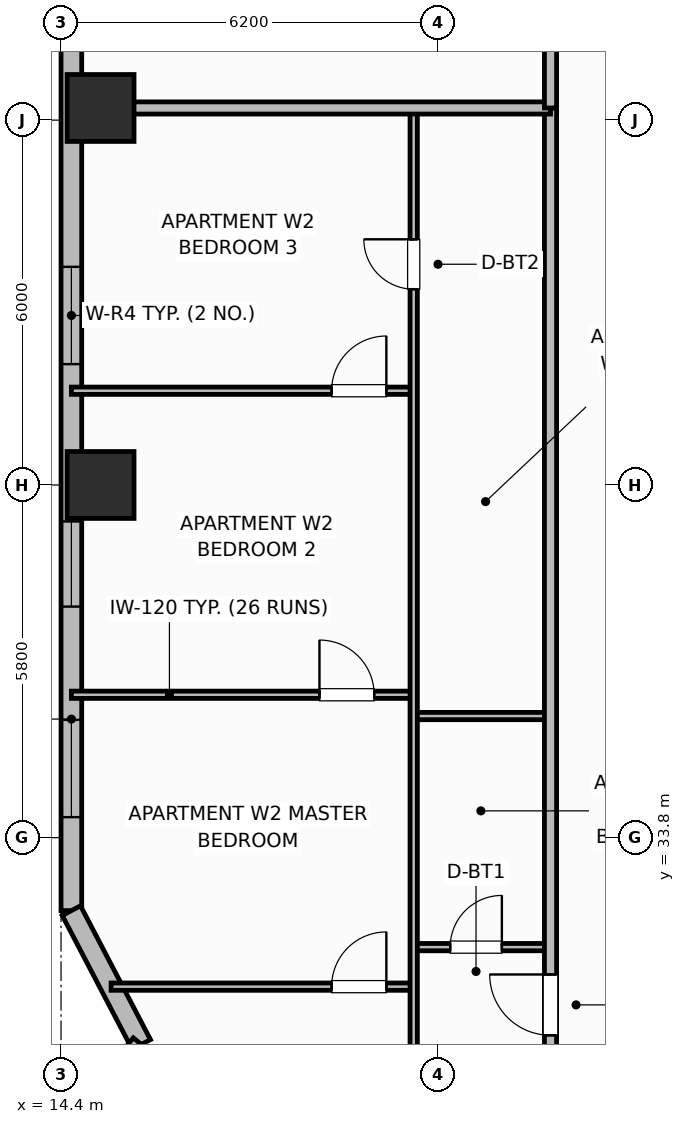
"""IFC4 building model, lengths in metres.
Left out: names, types, materials, properties, quantities, classifications, styles, units other than length and angle.
Written with IfcOpenShell. Run it as: python <this file> out.ifc"""

import sys

from ifc_helpers import new_model, si_unit, direction, frame, frame_2d, origin, origin_2d, place, context, subcontext, project, spatial, rectangle, extrude, element, fill, save


model = new_model("IFC4")
c1 = context("Model", 3, precision=1e-05, world=origin(), true_north=direction((0.0, 1.0)))
c2 = subcontext(c1, "Body", "Model", "MODEL_VIEW")
j1 = project(units=[si_unit("LENGTHUNIT", "METRE"), si_unit("PLANEANGLEUNIT", "RADIAN")], contexts=[c1])
p1 = place(None, origin())
s1 = spatial("IfcSite", under=j1, at=p1, CompositionType="ELEMENT")
p2 = place(p1, origin())
s2 = spatial("IfcBuilding", under=s1, at=p2, CompositionType="ELEMENT")
p3 = place(p2, frame((0.0, 0.0, 129.0)))
s3 = spatial("IfcBuildingStorey", under=s2, at=p3, CompositionType="ELEMENT", Elevation=129.0)
for number, where, z_axis, x_axis in (
    (1, (15.05, 39.6, 0.0), (0.0, 0.0, 1.0), (1.0, 0.0, 0.0)),
    (2, (15.05, 45.8, 0.0), (0.0, 0.0, 1.0), (1.0, 0.0, 0.0)),
):
    element("IfcColumn", number, at=place(p3, frame(where, z_axis=z_axis, x_axis=x_axis)), inside=s3, PredefinedType="COLUMN", context=c2, shape_type="SweptSolid", body=[
        extrude(rectangle(XDim=1.1, YDim=1.1, at=origin_2d()), origin(), (0.0, 0.0, 1.0), 3.7),
    ])
p4 = place(p3, frame((14.57, 47.4, 0.0), z_axis=(0.0, 0.0, 1.0), x_axis=(0.0, -1.0, 0.0)))
e3 = element("IfcWall", 3, at=p4, inside=s3, PredefinedType="SOLIDWALL", context=c2, shape_type="SweptSolid", body=[
    extrude(rectangle(XDim=14.8, YDim=0.34, at=frame_2d((7.4, 0.0))), origin(), (0.0, 0.0, 1.0), 2.7),
])
p5 = place(p4, frame((4.212, 0.0, 0.68)))
e4 = element("IfcOpeningElement", 4, at=p5, cuts=e3, PredefinedType="OPENING", context=c2, shape_type="SweptSolid", body=[
    extrude(rectangle(XDim=1.6, YDim=1.9, at=frame_2d((0.8, 0.95))), frame((0.0, 0.18, 0.0), z_axis=(0.0, -1.0, 0.0), x_axis=(1.0, 0.0, 0.0)), (0.0, 0.0, 1.0), 0.36),
])
p6 = place(p4, frame((8.4, 0.0, 0.69)))
e5 = element("IfcOpeningElement", 5, at=p6, cuts=e3, PredefinedType="OPENING", context=c2, shape_type="SweptSolid", body=[
    extrude(rectangle(XDim=1.4, YDim=1.85, at=frame_2d((0.7, 0.925))), frame((0.0, 0.18, 0.0), z_axis=(0.0, -1.0, 0.0), x_axis=(1.0, 0.0, 0.0)), (0.0, 0.0, 1.0), 0.36),
])
p7 = place(p4, frame((11.663, 0.0, 0.68)))
e6 = element("IfcOpeningElement", 6, at=p7, cuts=e3, PredefinedType="OPENING", context=c2, shape_type="SweptSolid", body=[
    extrude(rectangle(XDim=1.6, YDim=1.9, at=frame_2d((0.8, 0.95))), frame((0.0, 0.18, 0.0), z_axis=(0.0, -1.0, 0.0), x_axis=(1.0, 0.0, 0.0)), (0.0, 0.0, 1.0), 0.36),
])
p8 = place(p3, frame((14.57, 32.6, 0.0), z_axis=(0.0, 0.0, 1.0), x_axis=(0.463191013929, -0.88625847506, 0.0)))
e7 = element("IfcWall", 7, at=p8, inside=s3, PredefinedType="SOLIDWALL", context=c2, shape_type="SweptSolid", body=[
    extrude(rectangle(XDim=2.483, YDim=0.34, at=frame_2d((1.241, 0.0))), origin(), (0.0, 0.0, 1.0), 2.7),
])
p9 = place(p3, frame((15.72, 30.4, 0.0), z_axis=(0.0, 0.0, 1.0), x_axis=(-0.634733675645, -0.772730975827, 0.0)))
e8 = element("IfcWall", 8, at=p9, inside=s3, PredefinedType="SOLIDWALL", context=c2, shape_type="SweptSolid", body=[
    extrude(rectangle(XDim=1.812, YDim=0.34, at=frame_2d((0.906, 0.0))), origin(), (0.0, 0.0, 1.0), 2.7),
])
p10 = place(p3, frame((20.2, 32.0, 0.0), z_axis=(0.0, 0.0, 1.0), x_axis=(1.0, 0.0, 0.0)))
e9 = element("IfcWall", 9, at=p10, inside=s3, PredefinedType="PARTITIONING", context=c2, shape_type="SweptSolid", body=[
    extrude(rectangle(XDim=2.25, YDim=0.12, at=frame_2d((1.125, 0.0))), origin(), (0.0, 0.0, 1.0), 2.53),
])
p11 = place(p10, frame((0.6, 0.0, 0.0)))
e10 = element("IfcOpeningElement", 10, at=p11, cuts=e9, PredefinedType="OPENING", context=c2, shape_type="SweptSolid", body=[
    extrude(rectangle(XDim=0.85, YDim=2.1, at=frame_2d((0.425, 1.05))), frame((0.0, 0.07, 0.0), z_axis=(0.0, -1.0, 0.0), x_axis=(1.0, 0.0, 0.0)), (0.0, 0.0, 1.0), 0.14),
])
p12 = place(p3, frame((20.2, 35.8, 0.0), z_axis=(0.0, 0.0, 1.0), x_axis=(1.0, 0.0, 0.0)))
e11 = element("IfcWall", 11, at=p12, inside=s3, PredefinedType="PARTITIONING", context=c2, shape_type="SweptSolid", body=[
    extrude(rectangle(XDim=2.25, YDim=0.12, at=frame_2d((1.125, 0.0))), origin(), (0.0, 0.0, 1.0), 2.53),
])
p13 = place(p3, frame((15.223, 31.35, 0.0), z_axis=(0.0, 0.0, 1.0), x_axis=(1.0, 0.0, 0.0)))
e12 = element("IfcWall", 12, at=p13, inside=s3, PredefinedType="PARTITIONING", context=c2, shape_type="SweptSolid", body=[
    extrude(rectangle(XDim=4.977, YDim=0.12, at=frame_2d((2.488, 0.0))), origin(), (0.0, 0.0, 1.0), 2.53),
])
p14 = place(p13, frame((3.627, 0.0, 0.0)))
e13 = element("IfcOpeningElement", 13, at=p14, cuts=e12, PredefinedType="OPENING", context=c2, shape_type="SweptSolid", body=[
    extrude(rectangle(XDim=0.9, YDim=2.1, at=frame_2d((0.45, 1.05))), frame((0.0, 0.07, 0.0), z_axis=(0.0, -1.0, 0.0), x_axis=(1.0, 0.0, 0.0)), (0.0, 0.0, 1.0), 0.14),
])
p15 = place(p3, frame((14.57, 36.15, 0.0), z_axis=(0.0, 0.0, 1.0), x_axis=(1.0, 0.0, 0.0)))
e14 = element("IfcWall", 14, at=p15, inside=s3, PredefinedType="PARTITIONING", context=c2, shape_type="SweptSolid", body=[
    extrude(rectangle(XDim=5.63, YDim=0.12, at=frame_2d((2.815, 0.0))), origin(), (0.0, 0.0, 1.0), 2.53),
])
p16 = place(p15, frame((4.08, 0.0, 0.0)))
e15 = element("IfcOpeningElement", 15, at=p16, cuts=e14, PredefinedType="OPENING", context=c2, shape_type="SweptSolid", body=[
    extrude(rectangle(XDim=0.9, YDim=2.1, at=frame_2d((0.45, 1.05))), frame((0.0, 0.07, 0.0), z_axis=(0.0, -1.0, 0.0), x_axis=(1.0, 0.0, 0.0)), (0.0, 0.0, 1.0), 0.14),
])
p17 = place(p3, frame((14.57, 41.15, 0.0), z_axis=(0.0, 0.0, 1.0), x_axis=(1.0, 0.0, 0.0)))
e16 = element("IfcWall", 16, at=p17, inside=s3, PredefinedType="PARTITIONING", context=c2, shape_type="SweptSolid", body=[
    extrude(rectangle(XDim=5.63, YDim=0.12, at=frame_2d((2.815, 0.0))), origin(), (0.0, 0.0, 1.0), 2.53),
])
p18 = place(p17, frame((4.28, 0.0, 0.0)))
e17 = element("IfcOpeningElement", 17, at=p18, cuts=e16, PredefinedType="OPENING", context=c2, shape_type="SweptSolid", body=[
    extrude(rectangle(XDim=0.9, YDim=2.1, at=frame_2d((0.45, 1.05))), frame((0.0, 0.07, 0.0), z_axis=(0.0, -1.0, 0.0), x_axis=(1.0, 0.0, 0.0)), (0.0, 0.0, 1.0), 0.14),
])
p19 = place(p3, frame((20.2, 26.64, 0.0), z_axis=(0.0, 0.0, 1.0), x_axis=(0.0, 1.0, 0.0)))
e18 = element("IfcWall", 18, at=p19, inside=s3, PredefinedType="PARTITIONING", context=c2, shape_type="SweptSolid", body=[
    extrude(rectangle(XDim=19.12, YDim=0.12, at=frame_2d((9.56, 0.0))), origin(), (0.0, 0.0, 1.0), 2.53),
])
p20 = place(p19, frame((2.81, 0.0, 0.0)))
e19 = element("IfcOpeningElement", 19, at=p20, cuts=e18, PredefinedType="OPENING", context=c2, shape_type="SweptSolid", body=[
    extrude(rectangle(XDim=0.9, YDim=2.1, at=frame_2d((0.45, 1.05))), frame((0.0, 0.07, 0.0), z_axis=(0.0, -1.0, 0.0), x_axis=(1.0, 0.0, 0.0)), (0.0, 0.0, 1.0), 0.14),
])
p21 = place(p19, frame((16.18, 0.0, 0.0)))
e20 = element("IfcOpeningElement", 20, at=p21, cuts=e18, PredefinedType="OPENING", context=c2, shape_type="SweptSolid", body=[
    extrude(rectangle(XDim=0.82, YDim=2.08, at=frame_2d((0.41, 1.04))), frame((0.0, 0.07, 0.0), z_axis=(0.0, -1.0, 0.0), x_axis=(1.0, 0.0, 0.0)), (0.0, 0.0, 1.0), 0.14),
])
p22 = place(p3, frame((22.45, 10.6, 0.0), z_axis=(0.0, 0.0, 1.0), x_axis=(0.0, 1.0, 0.0)))
e21 = element("IfcWall", 21, at=p22, inside=s3, PredefinedType="PARTITIONING", context=c2, shape_type="SweptSolid", body=[
    extrude(rectangle(XDim=35.2, YDim=0.2, at=frame_2d((17.6, 0.0))), origin(), (0.0, 0.0, 1.0), 2.53),
])
p23 = place(p22, frame((2.65, 0.0, 0.0)))
e22 = element("IfcOpeningElement", 22, at=p23, cuts=e21, PredefinedType="OPENING", context=c2, shape_type="SweptSolid", body=[
    extrude(rectangle(XDim=1.0, YDim=2.15, at=frame_2d((0.5, 1.075))), frame((0.0, 0.11, 0.0), z_axis=(0.0, -1.0, 0.0), x_axis=(1.0, 0.0, 0.0)), (0.0, 0.0, 1.0), 0.22),
])
p24 = place(p22, frame((19.95, 0.0, 0.0)))
e23 = element("IfcOpeningElement", 23, at=p24, cuts=e21, PredefinedType="OPENING", context=c2, shape_type="SweptSolid", body=[
    extrude(rectangle(XDim=1.0, YDim=2.15, at=frame_2d((0.5, 1.075))), frame((0.0, 0.11, 0.0), z_axis=(0.0, -1.0, 0.0), x_axis=(1.0, 0.0, 0.0)), (0.0, 0.0, 1.0), 0.22),
])
p25 = place(p3, frame((14.99, 45.8, 0.0), z_axis=(0.0, 0.0, 1.0), x_axis=(1.0, 0.0, 0.0)))
e24 = element("IfcWall", 24, at=p25, inside=s3, PredefinedType="PARTITIONING", context=c2, shape_type="SweptSolid", body=[
    extrude(rectangle(XDim=7.46, YDim=0.2, at=frame_2d((3.73, 0.0))), origin(), (0.0, 0.0, 1.0), 2.53),
])
p26 = place(p3, frame((22.45, 45.8, 0.0), z_axis=(0.0, 0.0, 1.0), x_axis=(0.0, 1.0, 0.0)))
e25 = element("IfcWall", 25, at=p26, inside=s3, PredefinedType="PARTITIONING", context=c2, shape_type="SweptSolid", body=[
    extrude(rectangle(XDim=5.63, YDim=0.2, at=frame_2d((2.815, 0.0))), origin(), (0.0, 0.0, 1.0), 2.53),
])
p27 = place(p5, origin())
e26 = element("IfcWindow", 26, at=p27, inside=s3, PartitioningType="SINGLE_PANEL", PredefinedType="WINDOW", context=c2, shape_type="SweptSolid", body=[
    extrude(rectangle(XDim=1.6, YDim=1.9, at=frame_2d((0.8, 0.95))), frame((0.0, 0.03, 0.0), z_axis=(0.0, -1.0, 0.0), x_axis=(1.0, 0.0, 0.0)), (0.0, 0.0, 1.0), 0.06),
])
fill(e4, e26)
p28 = place(p6, origin())
e27 = element("IfcWindow", 27, at=p28, inside=s3, PartitioningType="SINGLE_PANEL", PredefinedType="WINDOW", context=c2, shape_type="SweptSolid", body=[
    extrude(rectangle(XDim=1.4, YDim=1.85, at=frame_2d((0.7, 0.925))), frame((0.0, 0.03, 0.0), z_axis=(0.0, -1.0, 0.0), x_axis=(1.0, 0.0, 0.0)), (0.0, 0.0, 1.0), 0.06),
])
fill(e5, e27)
p29 = place(p7, origin())
e28 = element("IfcWindow", 28, at=p29, inside=s3, PartitioningType="SINGLE_PANEL", PredefinedType="WINDOW", context=c2, shape_type="SweptSolid", body=[
    extrude(rectangle(XDim=1.6, YDim=1.9, at=frame_2d((0.8, 0.95))), frame((0.0, 0.03, 0.0), z_axis=(0.0, -1.0, 0.0), x_axis=(1.0, 0.0, 0.0)), (0.0, 0.0, 1.0), 0.06),
])
fill(e6, e28)
p30 = place(p11, origin())
e29 = element("IfcDoor", 29, at=p30, inside=s3, OperationType="SINGLE_SWING_RIGHT", PredefinedType="DOOR", context=c2, shape_type="SweptSolid", body=[
    extrude(rectangle(XDim=0.85, YDim=2.1, at=frame_2d((0.425, 1.05))), frame((0.0, 0.025, 0.0), z_axis=(0.0, -1.0, 0.0), x_axis=(1.0, 0.0, 0.0)), (0.0, 0.0, 1.0), 0.05),
])
fill(e10, e29)
p31 = place(p14, origin())
e30 = element("IfcDoor", 30, at=p31, inside=s3, OperationType="SINGLE_SWING_RIGHT", PredefinedType="DOOR", context=c2, shape_type="SweptSolid", body=[
    extrude(rectangle(XDim=0.9, YDim=2.1, at=frame_2d((0.45, 1.05))), frame((0.0, 0.025, 0.0), z_axis=(0.0, -1.0, 0.0), x_axis=(1.0, 0.0, 0.0)), (0.0, 0.0, 1.0), 0.05),
])
fill(e13, e30)
p32 = place(p16, origin())
e31 = element("IfcDoor", 31, at=p32, inside=s3, OperationType="SINGLE_SWING_LEFT", PredefinedType="DOOR", context=c2, shape_type="SweptSolid", body=[
    extrude(rectangle(XDim=0.9, YDim=2.1, at=frame_2d((0.45, 1.05))), frame((0.0, 0.025, 0.0), z_axis=(0.0, -1.0, 0.0), x_axis=(1.0, 0.0, 0.0)), (0.0, 0.0, 1.0), 0.05),
])
fill(e15, e31)
p33 = place(p18, origin())
e32 = element("IfcDoor", 32, at=p33, inside=s3, OperationType="SINGLE_SWING_RIGHT", PredefinedType="DOOR", context=c2, shape_type="SweptSolid", body=[
    extrude(rectangle(XDim=0.9, YDim=2.1, at=frame_2d((0.45, 1.05))), frame((0.0, 0.025, 0.0), z_axis=(0.0, -1.0, 0.0), x_axis=(1.0, 0.0, 0.0)), (0.0, 0.0, 1.0), 0.05),
])
fill(e17, e32)
p34 = place(p21, origin())
e33 = element("IfcDoor", 33, at=p34, inside=s3, OperationType="SINGLE_SWING_RIGHT", PredefinedType="DOOR", context=c2, shape_type="SweptSolid", body=[
    extrude(rectangle(XDim=0.82, YDim=2.08, at=frame_2d((0.41, 1.04))), frame((0.0, 0.025, 0.0), z_axis=(0.0, -1.0, 0.0), x_axis=(1.0, 0.0, 0.0)), (0.0, 0.0, 1.0), 0.05),
])
fill(e20, e33)
p35 = place(p24, origin())
e34 = element("IfcDoor", 34, at=p35, inside=s3, OperationType="SINGLE_SWING_RIGHT", PredefinedType="DOOR", context=c2, shape_type="SweptSolid", body=[
    extrude(rectangle(XDim=1.0, YDim=2.15, at=frame_2d((0.5, 1.075))), frame((0.0, 0.025, 0.0), z_axis=(0.0, -1.0, 0.0), x_axis=(1.0, 0.0, 0.0)), (0.0, 0.0, 1.0), 0.05),
])
fill(e23, e34)
save(model, sys.argv[1])
